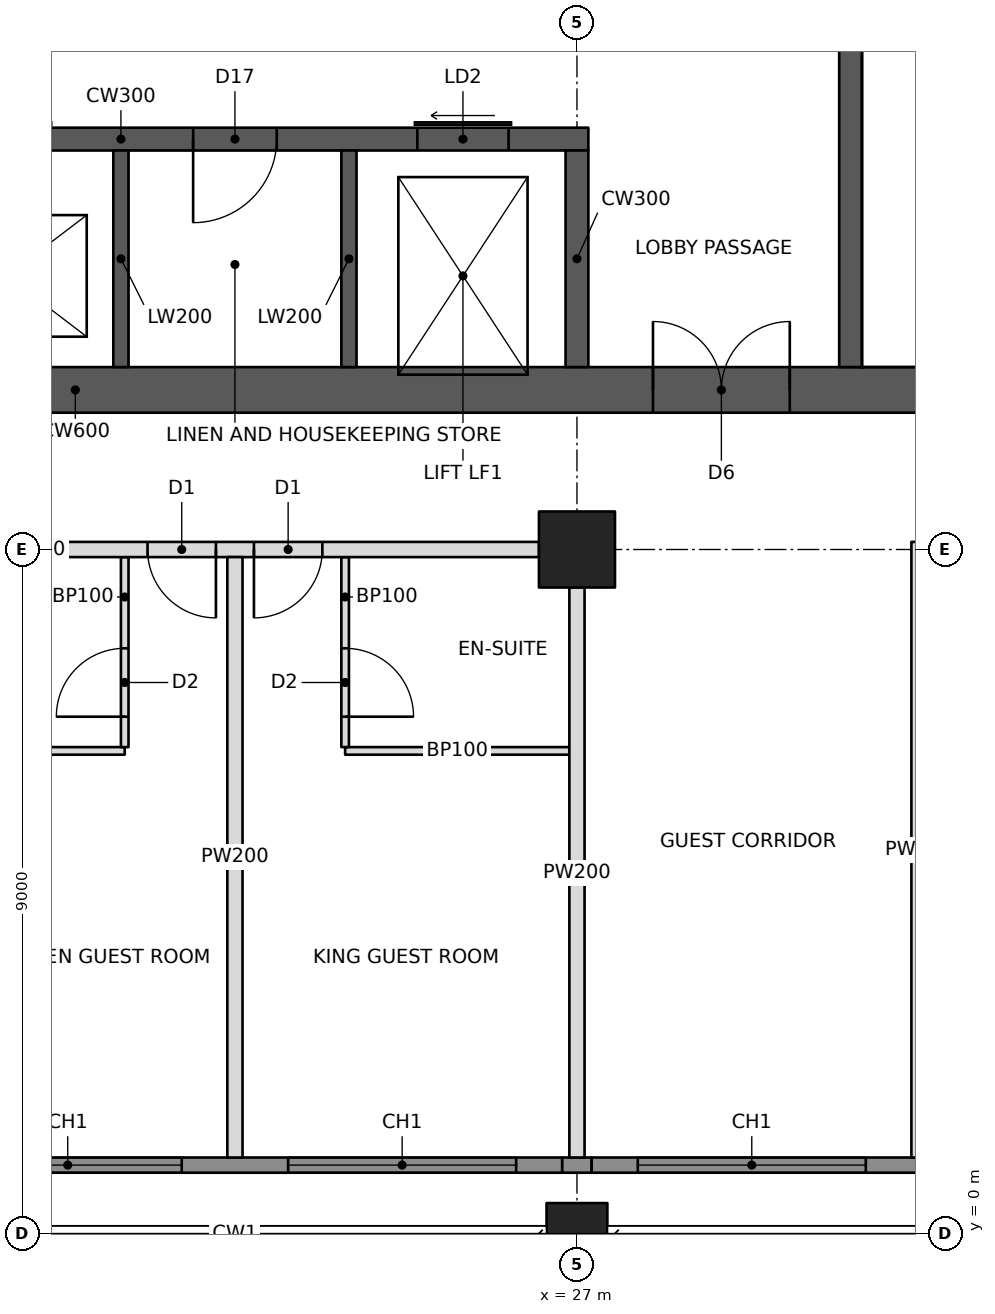
"""IFC4 building model, lengths in metres.
Left out: names, types, materials, properties, quantities, classifications, styles, units other than length and angle.
Written with IfcOpenShell. Run it as: python <this file> out.ifc"""

import sys

from ifc_helpers import new_model, si_unit, direction, frame, frame_2d, origin, origin_2d, place, context, subcontext, project, spatial, rectangle, hollow_rectangle, extrude, element, fill, save


model = new_model("IFC4")
c1 = context("Model", 3, precision=1e-05, world=origin(), true_north=direction((0.0, 1.0)))
c2 = subcontext(c1, "Body", "Model", "MODEL_VIEW")
j1 = project(units=[si_unit("LENGTHUNIT", "METRE"), si_unit("PLANEANGLEUNIT", "RADIAN")], contexts=[c1])
p1 = place(None, origin())
s1 = spatial("IfcSite", under=j1, at=p1, CompositionType="ELEMENT")
p2 = place(p1, origin())
s2 = spatial("IfcBuilding", under=s1, at=p2, CompositionType="ELEMENT")
p3 = place(p2, frame((0.0, 0.0, 163.8)))
s3 = spatial("IfcBuildingStorey", under=s2, at=p3, CompositionType="ELEMENT", Elevation=163.8)
p4 = place(p3, frame((27.0, 0.0, 0.0), z_axis=(0.0, 0.0, 1.0), x_axis=(1.0, 0.0, 0.0)))
e1 = element("IfcColumn", 1, at=p4, inside=s3, PredefinedType="COLUMN", context=c2, shape_type="SweptSolid", body=[
    extrude(hollow_rectangle(XDim=0.8, YDim=0.8, WallThickness=0.07, at=origin_2d()), origin(), (0.0, 0.0, 1.0), 3.4),
])
p5 = place(p3, frame((27.0, 9.0, 0.0), z_axis=(0.0, 0.0, 1.0), x_axis=(1.0, 0.0, 0.0)))
e2 = element("IfcColumn", 2, at=p5, inside=s3, PredefinedType="COLUMN", context=c2, shape_type="SweptSolid", body=[
    extrude(hollow_rectangle(XDim=1.0, YDim=1.0, WallThickness=0.1, at=origin_2d()), origin(), (0.0, 0.0, 1.0), 3.4),
])
p6 = place(p3, frame((10.8, 11.1, 0.0), z_axis=(0.0, 0.0, 1.0), x_axis=(1.0, 0.0, 0.0)))
e3 = element("IfcWall", 3, at=p6, inside=s3, PredefinedType="SHEAR", context=c2, shape_type="SweptSolid", body=[
    extrude(rectangle(XDim=23.4, YDim=0.6, at=frame_2d((11.7, 0.0))), origin(), (0.0, 0.0, 1.0), 3.4),
])
p7 = place(p6, frame((1.0, 0.0, 0.0)))
e4 = element("IfcOpeningElement", 4, at=p7, cuts=e3, PredefinedType="OPENING", context=c2, shape_type="SweptSolid", body=[
    extrude(rectangle(XDim=1.0, YDim=2.1, at=frame_2d((0.5, 1.05))), frame((0.0, 0.31, 0.0), z_axis=(0.0, -1.0, 0.0), x_axis=(1.0, 0.0, 0.0)), (0.0, 0.0, 1.0), 0.62),
])
p8 = place(p6, frame((17.2, 0.0, 0.0)))
e5 = element("IfcOpeningElement", 5, at=p8, cuts=e3, PredefinedType="OPENING", context=c2, shape_type="SweptSolid", body=[
    extrude(rectangle(XDim=1.8, YDim=2.1, at=frame_2d((0.9, 1.05))), frame((0.0, 0.31, 0.0), z_axis=(0.0, -1.0, 0.0), x_axis=(1.0, 0.0, 0.0)), (0.0, 0.0, 1.0), 0.62),
])
p9 = place(p3, frame((18.15, 14.4, 0.0), z_axis=(0.0, 0.0, 1.0), x_axis=(1.0, 0.0, 0.0)))
e6 = element("IfcWall", 6, at=p9, inside=s3, PredefinedType="SHEAR", context=c2, shape_type="SweptSolid", body=[
    extrude(rectangle(XDim=9.0, YDim=0.3, at=frame_2d((4.5, 0.0))), origin(), (0.0, 0.0, 1.0), 3.4),
])
p10 = place(p9, frame((0.8, 0.0, 0.0)))
e7 = element("IfcOpeningElement", 7, at=p10, cuts=e6, PredefinedType="OPENING", context=c2, shape_type="SweptSolid", body=[
    extrude(rectangle(XDim=1.1, YDim=2.1, at=frame_2d((0.55, 1.05))), frame((0.0, 0.16, 0.0), z_axis=(0.0, -1.0, 0.0), x_axis=(1.0, 0.0, 0.0)), (0.0, 0.0, 1.0), 0.32),
])
p11 = place(p9, frame((6.75, 0.0, 0.0)))
e8 = element("IfcOpeningElement", 8, at=p11, cuts=e6, PredefinedType="OPENING", context=c2, shape_type="SweptSolid", body=[
    extrude(rectangle(XDim=1.2, YDim=2.1, at=frame_2d((0.6, 1.05))), frame((0.0, 0.16, 0.0), z_axis=(0.0, -1.0, 0.0), x_axis=(1.0, 0.0, 0.0)), (0.0, 0.0, 1.0), 0.32),
])
p12 = place(p9, frame((3.8, 0.0, 0.0)))
e9 = element("IfcOpeningElement", 9, at=p12, cuts=e6, PredefinedType="OPENING", context=c2, shape_type="SweptSolid", body=[
    extrude(rectangle(XDim=1.1, YDim=2.1, at=frame_2d((0.55, 1.05))), frame((0.0, 0.16, 0.0), z_axis=(0.0, -1.0, 0.0), x_axis=(1.0, 0.0, 0.0)), (0.0, 0.0, 1.0), 0.32),
])
p13 = place(p3, frame((27.0, 11.4, 0.0), z_axis=(0.0, 0.0, 1.0), x_axis=(0.0, 1.0, 0.0)))
e10 = element("IfcWall", 10, at=p13, inside=s3, PredefinedType="SHEAR", context=c2, shape_type="SweptSolid", body=[
    extrude(rectangle(XDim=2.85, YDim=0.3, at=frame_2d((1.425, 0.0))), origin(), (0.0, 0.0, 1.0), 3.4),
])
for number, where, z_axis, x_axis in (
    (11, (21.0, 11.4, 0.0), (0.0, 0.0, 1.0), (0.0, 1.0, 0.0)),
    (12, (24.0, 11.4, 0.0), (0.0, 0.0, 1.0), (0.0, 1.0, 0.0)),
):
    element("IfcWall", number, at=place(p3, frame(where, z_axis=z_axis, x_axis=x_axis)), inside=s3, PredefinedType="SHEAR", context=c2, shape_type="SweptSolid", body=[
        extrude(rectangle(XDim=2.85, YDim=0.2, at=frame_2d((1.425, 0.0))), origin(), (0.0, 0.0, 1.0), 3.4),
    ])
p14 = place(p3, frame((30.6, 11.4, 0.0), z_axis=(0.0, 0.0, 1.0), x_axis=(0.0, 1.0, 0.0)))
e13 = element("IfcWall", 13, at=p14, inside=s3, PredefinedType="SHEAR", context=c2, shape_type="SweptSolid", body=[
    extrude(rectangle(XDim=13.2, YDim=0.3, at=frame_2d((6.6, 0.0))), origin(), (0.0, 0.0, 1.0), 3.4),
])
p15 = place(p3, frame((18.5, 9.0, 0.0), z_axis=(0.0, 0.0, 1.0), x_axis=(1.0, 0.0, 0.0)))
e14 = element("IfcWall", 14, at=p15, inside=s3, PredefinedType="PARTITIONING", context=c2, shape_type="SweptSolid", body=[
    extrude(rectangle(XDim=8.0, YDim=0.2, at=frame_2d((4.0, 0.0))), origin(), (0.0, 0.0, 1.0), 2.405),
])
p16 = place(p15, frame((2.85, 0.0, 0.0)))
e15 = element("IfcOpeningElement", 15, at=p16, cuts=e14, PredefinedType="OPENING", context=c2, shape_type="SweptSolid", body=[
    extrude(rectangle(XDim=0.9, YDim=2.1, at=frame_2d((0.45, 1.05))), frame((0.0, 0.11, 0.0), z_axis=(0.0, -1.0, 0.0), x_axis=(1.0, 0.0, 0.0)), (0.0, 0.0, 1.0), 0.22),
])
p17 = place(p15, frame((4.25, 0.0, 0.0)))
e16 = element("IfcOpeningElement", 16, at=p17, cuts=e14, PredefinedType="OPENING", context=c2, shape_type="SweptSolid", body=[
    extrude(rectangle(XDim=0.9, YDim=2.1, at=frame_2d((0.45, 1.05))), frame((0.0, 0.11, 0.0), z_axis=(0.0, -1.0, 0.0), x_axis=(1.0, 0.0, 0.0)), (0.0, 0.0, 1.0), 0.22),
])
p18 = place(p3, frame((22.5, 8.9, 0.0), z_axis=(0.0, 0.0, 1.0), x_axis=(0.0, -1.0, 0.0)))
e17 = element("IfcWall", 17, at=p18, inside=s3, PredefinedType="PARTITIONING", context=c2, shape_type="SweptSolid", body=[
    extrude(rectangle(XDim=7.9, YDim=0.2, at=frame_2d((3.95, 0.0))), origin(), (0.0, 0.0, 1.0), 2.404),
])
p19 = place(p3, frame((27.0, 8.5, 0.0), z_axis=(0.0, 0.0, 1.0), x_axis=(0.0, -1.0, 0.0)))
e18 = element("IfcWall", 18, at=p19, inside=s3, PredefinedType="PARTITIONING", context=c2, shape_type="SweptSolid", body=[
    extrude(rectangle(XDim=7.5, YDim=0.2, at=frame_2d((3.75, 0.0))), origin(), (0.0, 0.0, 1.0), 2.405),
])
p20 = place(p3, frame((31.5, 9.1, 0.0), z_axis=(0.0, 0.0, 1.0), x_axis=(0.0, -1.0, 0.0)))
e19 = element("IfcWall", 19, at=p20, inside=s3, PredefinedType="PARTITIONING", context=c2, shape_type="SweptSolid", body=[
    extrude(rectangle(XDim=8.1, YDim=0.2, at=frame_2d((4.05, 0.0))), origin(), (0.0, 0.0, 1.0), 2.404),
])
p21 = place(p3, frame((18.1, 6.35, 0.0), z_axis=(0.0, 0.0, 1.0), x_axis=(1.0, 0.0, 0.0)))
e20 = element("IfcWall", 20, at=p21, inside=s3, PredefinedType="PARTITIONING", context=c2, shape_type="SweptSolid", body=[
    extrude(rectangle(XDim=2.95, YDim=0.1, at=frame_2d((1.475, 0.0))), origin(), (0.0, 0.0, 1.0), 2.404),
])
p22 = place(p3, frame((21.05, 8.9, 0.0), z_axis=(0.0, 0.0, 1.0), x_axis=(0.0, -1.0, 0.0)))
e21 = element("IfcWall", 21, at=p22, inside=s3, PredefinedType="PARTITIONING", context=c2, shape_type="SweptSolid", body=[
    extrude(rectangle(XDim=2.5, YDim=0.1, at=frame_2d((1.25, 0.0))), origin(), (0.0, 0.0, 1.0), 2.404),
])
p23 = place(p22, frame((1.2, 0.0, 0.0)))
e22 = element("IfcOpeningElement", 22, at=p23, cuts=e21, PredefinedType="OPENING", context=c2, shape_type="SweptSolid", body=[
    extrude(rectangle(XDim=0.9, YDim=2.1, at=frame_2d((0.45, 1.05))), frame((0.0, 0.06, 0.0), z_axis=(0.0, -1.0, 0.0), x_axis=(1.0, 0.0, 0.0)), (0.0, 0.0, 1.0), 0.12),
])
p24 = place(p3, frame((23.95, 6.35, 0.0), z_axis=(0.0, 0.0, 1.0), x_axis=(1.0, 0.0, 0.0)))
e23 = element("IfcWall", 23, at=p24, inside=s3, PredefinedType="PARTITIONING", context=c2, shape_type="SweptSolid", body=[
    extrude(rectangle(XDim=2.95, YDim=0.1, at=frame_2d((1.475, 0.0))), origin(), (0.0, 0.0, 1.0), 2.404),
])
p25 = place(p3, frame((23.95, 8.9, 0.0), z_axis=(0.0, 0.0, 1.0), x_axis=(0.0, -1.0, 0.0)))
e24 = element("IfcWall", 24, at=p25, inside=s3, PredefinedType="PARTITIONING", context=c2, shape_type="SweptSolid", body=[
    extrude(rectangle(XDim=2.5, YDim=0.1, at=frame_2d((1.25, 0.0))), origin(), (0.0, 0.0, 1.0), 2.404),
])
p26 = place(p25, frame((1.2, 0.0, 0.0)))
e25 = element("IfcOpeningElement", 25, at=p26, cuts=e24, PredefinedType="OPENING", context=c2, shape_type="SweptSolid", body=[
    extrude(rectangle(XDim=0.9, YDim=2.1, at=frame_2d((0.45, 1.05))), frame((0.0, 0.06, 0.0), z_axis=(0.0, -1.0, 0.0), x_axis=(1.0, 0.0, 0.0)), (0.0, 0.0, 1.0), 0.12),
])
p27 = place(p3, frame((18.194, 0.9, 0.0), z_axis=(0.0, 0.0, 1.0), x_axis=(1.0, 0.0, 0.0)))
e26 = element("IfcWall", 26, at=p27, inside=s3, PredefinedType="SOLIDWALL", context=c2, shape_type="SweptSolid", body=[
    extrude(rectangle(XDim=8.612, YDim=0.2, at=frame_2d((4.306, 0.0))), origin(), (0.0, 0.0, 1.0), 3.2),
])
p28 = place(p27, frame((0.606, 0.0, 0.6)))
e27 = element("IfcOpeningElement", 27, at=p28, cuts=e26, PredefinedType="OPENING", context=c2, shape_type="SweptSolid", body=[
    extrude(rectangle(XDim=3.0, YDim=2.2, at=frame_2d((1.5, 1.1))), frame((0.0, 0.11, 0.0), z_axis=(0.0, -1.0, 0.0), x_axis=(1.0, 0.0, 0.0)), (0.0, 0.0, 1.0), 0.22),
])
p29 = place(p27, frame((5.006, 0.0, 0.6)))
e28 = element("IfcOpeningElement", 28, at=p29, cuts=e26, PredefinedType="OPENING", context=c2, shape_type="SweptSolid", body=[
    extrude(rectangle(XDim=3.0, YDim=2.2, at=frame_2d((1.5, 1.1))), frame((0.0, 0.11, 0.0), z_axis=(0.0, -1.0, 0.0), x_axis=(1.0, 0.0, 0.0)), (0.0, 0.0, 1.0), 0.22),
])
p30 = place(p3, frame((26.806, 0.9, 0.0), z_axis=(0.0, 0.0, 1.0), x_axis=(1.0, 0.0, 0.0)))
e29 = element("IfcWall", 29, at=p30, inside=s3, PredefinedType="SOLIDWALL", context=c2, shape_type="SweptSolid", body=[
    extrude(rectangle(XDim=0.388, YDim=0.2, at=frame_2d((0.194, 0.0))), origin(), (0.0, 0.0, 1.0), 2.404),
])
p31 = place(p3, frame((27.194, 0.9, 0.0), z_axis=(0.0, 0.0, 1.0), x_axis=(1.0, 0.0, 0.0)))
e30 = element("IfcWall", 30, at=p31, inside=s3, PredefinedType="SOLIDWALL", context=c2, shape_type="SweptSolid", body=[
    extrude(rectangle(XDim=8.671, YDim=0.2, at=frame_2d((4.335, 0.0))), origin(), (0.0, 0.0, 1.0), 3.2),
])
p32 = place(p31, frame((0.606, 0.0, 0.6)))
e31 = element("IfcOpeningElement", 31, at=p32, cuts=e30, PredefinedType="OPENING", context=c2, shape_type="SweptSolid", body=[
    extrude(rectangle(XDim=3.0, YDim=2.2, at=frame_2d((1.5, 1.1))), frame((0.0, 0.11, 0.0), z_axis=(0.0, -1.0, 0.0), x_axis=(1.0, 0.0, 0.0)), (0.0, 0.0, 1.0), 0.22),
])
p33 = place(p31, frame((5.006, 0.0, 0.6)))
e32 = element("IfcOpeningElement", 32, at=p33, cuts=e30, PredefinedType="OPENING", context=c2, shape_type="SweptSolid", body=[
    extrude(rectangle(XDim=3.0, YDim=2.2, at=frame_2d((1.5, 1.1))), frame((0.0, 0.11, 0.0), z_axis=(0.0, -1.0, 0.0), x_axis=(1.0, 0.0, 0.0)), (0.0, 0.0, 1.0), 0.22),
])
p34 = place(p28, origin())
e33 = element("IfcWindow", 33, at=p34, inside=s3, PartitioningType="TRIPLE_PANEL_VERTICAL", PredefinedType="WINDOW", context=c2, shape_type="SweptSolid", body=[
    extrude(rectangle(XDim=3.0, YDim=2.2, at=frame_2d((1.5, 1.1))), frame((0.0, 0.03, 0.0), z_axis=(0.0, -1.0, 0.0), x_axis=(1.0, 0.0, 0.0)), (0.0, 0.0, 1.0), 0.06),
])
fill(e27, e33)
p35 = place(p29, origin())
e34 = element("IfcWindow", 34, at=p35, inside=s3, PartitioningType="TRIPLE_PANEL_VERTICAL", PredefinedType="WINDOW", context=c2, shape_type="SweptSolid", body=[
    extrude(rectangle(XDim=3.0, YDim=2.2, at=frame_2d((1.5, 1.1))), frame((0.0, 0.03, 0.0), z_axis=(0.0, -1.0, 0.0), x_axis=(1.0, 0.0, 0.0)), (0.0, 0.0, 1.0), 0.06),
])
fill(e28, e34)
p36 = place(p32, origin())
e35 = element("IfcWindow", 35, at=p36, inside=s3, PartitioningType="TRIPLE_PANEL_VERTICAL", PredefinedType="WINDOW", context=c2, shape_type="SweptSolid", body=[
    extrude(rectangle(XDim=3.0, YDim=2.2, at=frame_2d((1.5, 1.1))), frame((0.0, 0.03, 0.0), z_axis=(0.0, -1.0, 0.0), x_axis=(1.0, 0.0, 0.0)), (0.0, 0.0, 1.0), 0.06),
])
fill(e31, e35)
p37 = place(p23, frame((0.9, 0.0, 0.0), z_axis=(0.0, 0.0, 1.0), x_axis=(-1.0, 0.0, 0.0)))
e36 = element("IfcDoor", 36, at=p37, inside=s3, OperationType="SINGLE_SWING_LEFT", PredefinedType="DOOR", context=c2, shape_type="SweptSolid", body=[
    extrude(rectangle(XDim=0.9, YDim=2.1, at=frame_2d((0.45, 1.05))), frame((0.0, 0.025, 0.0), z_axis=(0.0, -1.0, 0.0), x_axis=(1.0, 0.0, 0.0)), (0.0, 0.0, 1.0), 0.05),
])
fill(e22, e36)
p38 = place(p16, frame((0.9, 0.0, 0.0), z_axis=(0.0, 0.0, 1.0), x_axis=(-1.0, 0.0, 0.0)))
e37 = element("IfcDoor", 37, at=p38, inside=s3, OperationType="SINGLE_SWING_LEFT", PredefinedType="DOOR", context=c2, shape_type="SweptSolid", body=[
    extrude(rectangle(XDim=0.9, YDim=2.1, at=frame_2d((0.45, 1.05))), frame((0.0, 0.025, 0.0), z_axis=(0.0, -1.0, 0.0), x_axis=(1.0, 0.0, 0.0)), (0.0, 0.0, 1.0), 0.05),
])
fill(e15, e37)
p39 = place(p26, origin())
e38 = element("IfcDoor", 38, at=p39, inside=s3, OperationType="SINGLE_SWING_RIGHT", PredefinedType="DOOR", context=c2, shape_type="SweptSolid", body=[
    extrude(rectangle(XDim=0.9, YDim=2.1, at=frame_2d((0.45, 1.05))), frame((0.0, 0.025, 0.0), z_axis=(0.0, -1.0, 0.0), x_axis=(1.0, 0.0, 0.0)), (0.0, 0.0, 1.0), 0.05),
])
fill(e25, e38)
p40 = place(p17, frame((0.9, 0.0, 0.0), z_axis=(0.0, 0.0, 1.0), x_axis=(-1.0, 0.0, 0.0)))
e39 = element("IfcDoor", 39, at=p40, inside=s3, OperationType="SINGLE_SWING_RIGHT", PredefinedType="DOOR", context=c2, shape_type="SweptSolid", body=[
    extrude(rectangle(XDim=0.9, YDim=2.1, at=frame_2d((0.45, 1.05))), frame((0.0, 0.025, 0.0), z_axis=(0.0, -1.0, 0.0), x_axis=(1.0, 0.0, 0.0)), (0.0, 0.0, 1.0), 0.05),
])
fill(e16, e39)
p41 = place(p8, origin())
e40 = element("IfcDoor", 40, at=p41, inside=s3, OperationType="DOUBLE_DOOR_SINGLE_SWING", PredefinedType="DOOR", context=c2, shape_type="SweptSolid", body=[
    extrude(rectangle(XDim=1.8, YDim=2.1, at=frame_2d((0.9, 1.05))), frame((0.0, 0.025, 0.0), z_axis=(0.0, -1.0, 0.0), x_axis=(1.0, 0.0, 0.0)), (0.0, 0.0, 1.0), 0.05),
])
fill(e5, e40)
p42 = place(p11, origin())
e41 = element("IfcDoor", 41, at=p42, inside=s3, OperationType="SLIDING_TO_LEFT", PredefinedType="DOOR", context=c2, shape_type="SweptSolid", body=[
    extrude(rectangle(XDim=1.2, YDim=2.1, at=frame_2d((0.6, 1.05))), frame((0.0, 0.025, 0.0), z_axis=(0.0, -1.0, 0.0), x_axis=(1.0, 0.0, 0.0)), (0.0, 0.0, 1.0), 0.05),
])
fill(e8, e41)
p43 = place(p12, frame((1.1, 0.0, 0.0), z_axis=(0.0, 0.0, 1.0), x_axis=(-1.0, 0.0, 0.0)))
e42 = element("IfcDoor", 42, at=p43, inside=s3, OperationType="SINGLE_SWING_RIGHT", PredefinedType="DOOR", context=c2, shape_type="SweptSolid", body=[
    extrude(rectangle(XDim=1.1, YDim=2.1, at=frame_2d((0.55, 1.05))), frame((0.0, 0.025, 0.0), z_axis=(0.0, -1.0, 0.0), x_axis=(1.0, 0.0, 0.0)), (0.0, 0.0, 1.0), 0.05),
])
fill(e9, e42)
save(model, sys.argv[1])
